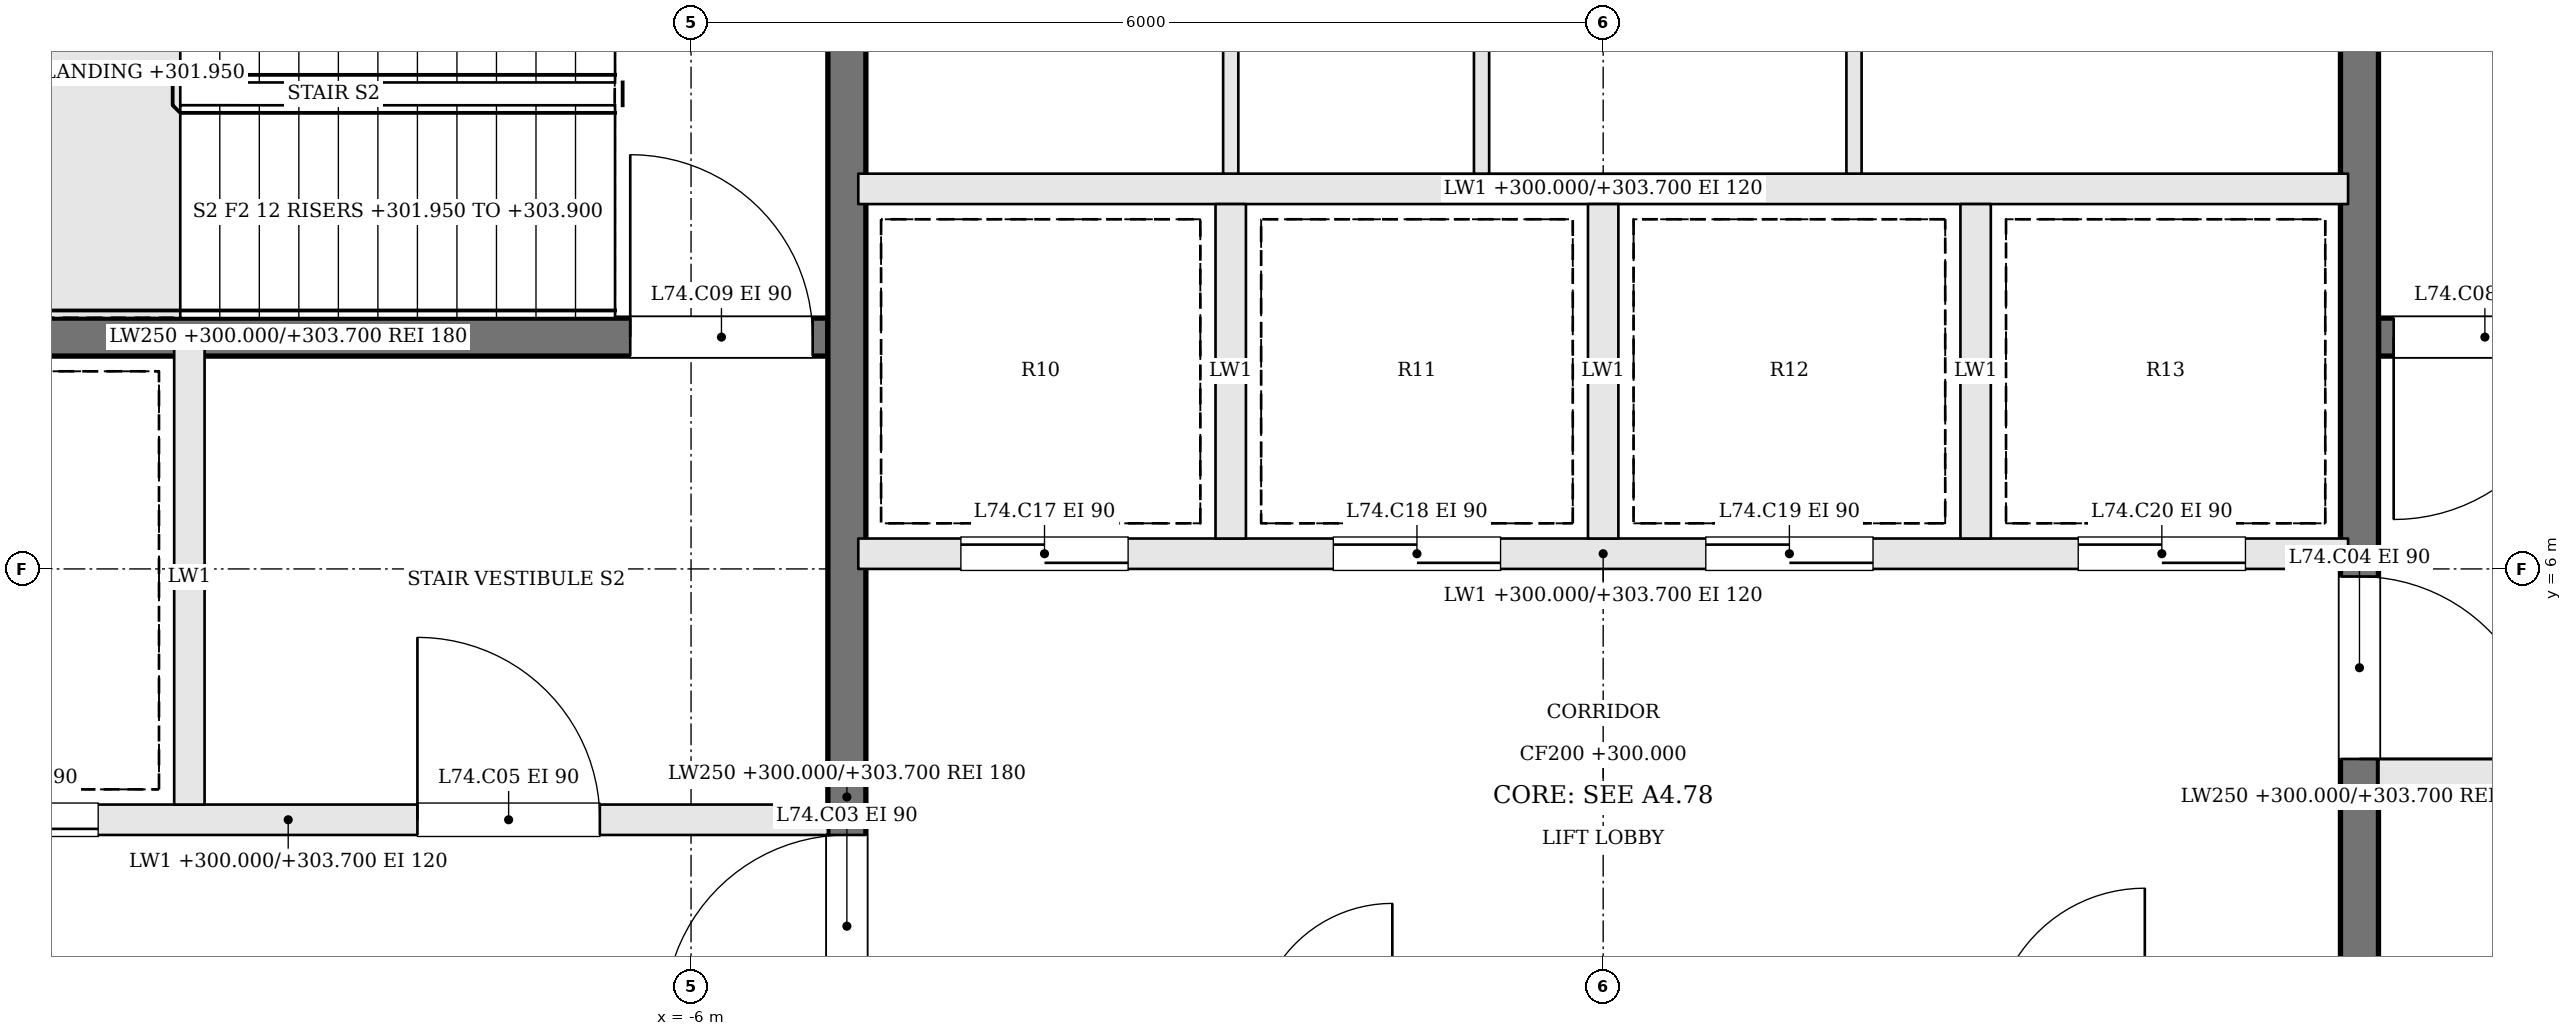
"""IFC4 building model, lengths in metres.
Left out: names, types, materials, properties, quantities, classifications, styles, units other than length and angle.
Written with IfcOpenShell. Run it as: python <this file> out.ifc"""

import sys

from ifc_helpers import new_model, si_unit, direction, frame, frame_2d, origin, place, context, subcontext, project, spatial, rectangle, extrude, element, fill, save


model = new_model("IFC4")
c1 = context("Model", 3, precision=1e-05, world=origin(), true_north=direction((0.0, 1.0)))
c2 = subcontext(c1, "Body", "Model", "MODEL_VIEW")
j1 = project(units=[si_unit("LENGTHUNIT", "METRE"), si_unit("PLANEANGLEUNIT", "RADIAN")], contexts=[c1])
p1 = place(None, origin())
s1 = spatial("IfcSite", under=j1, at=p1, CompositionType="ELEMENT")
p2 = place(p1, origin())
s2 = spatial("IfcBuilding", under=s1, at=p2, CompositionType="ELEMENT")
p3 = place(p2, frame((0.0, 0.0, 300.0)))
s3 = spatial("IfcBuildingStorey", under=s2, at=p3, CompositionType="ELEMENT", Elevation=300.0)
p4 = place(p3, frame((12.2, 7.525, 0.0), z_axis=(0.0, 0.0, 1.0), x_axis=(-1.0, 0.0, 0.0)))
e1 = element("IfcWall", 1, at=p4, inside=s3, PredefinedType="SOLIDWALL", context=c2, shape_type="SweptSolid", body=[
    extrude(rectangle(XDim=7.1, YDim=0.25, at=frame_2d((3.55, 0.0))), origin(), (0.0, 0.0, 1.0), 3.7),
])
p5 = place(p4, frame((5.8, 0.0, 0.0)))
e2 = element("IfcOpeningElement", 2, at=p5, cuts=e1, PredefinedType="OPENING", context=c2, shape_type="SweptSolid", body=[
    extrude(rectangle(XDim=1.2, YDim=2.1, at=frame_2d((0.6, 1.05))), frame((0.0, 0.135, 0.0), z_axis=(0.0, -1.0, 0.0), x_axis=(1.0, 0.0, 0.0)), (0.0, 0.0, 1.0), 0.27),
])
p6 = place(p3, frame((-12.2, 4.35, 0.0), z_axis=(0.0, 0.0, 1.0), x_axis=(1.0, 0.0, 0.0)))
e3 = element("IfcWall", 3, at=p6, inside=s3, PredefinedType="SOLIDWALL", context=c2, shape_type="SweptSolid", body=[
    extrude(rectangle(XDim=7.1, YDim=0.2, at=frame_2d((3.55, 0.0))), origin(), (0.0, 0.0, 1.0), 3.7),
])
p7 = place(p6, frame((4.4, 0.0, 0.0)))
e4 = element("IfcOpeningElement", 4, at=p7, cuts=e3, PredefinedType="OPENING", context=c2, shape_type="SweptSolid", body=[
    extrude(rectangle(XDim=1.2, YDim=2.1, at=frame_2d((0.6, 1.05))), frame((0.0, 0.11, 0.0), z_axis=(0.0, -1.0, 0.0), x_axis=(1.0, 0.0, 0.0)), (0.0, 0.0, 1.0), 0.22),
])
p8 = place(p6, frame((1.1, 0.0, 0.0)))
e5 = element("IfcOpeningElement", 5, at=p8, cuts=e3, PredefinedType="OPENING", context=c2, shape_type="SweptSolid", body=[
    extrude(rectangle(XDim=1.2, YDim=2.1, at=frame_2d((0.6, 1.05))), frame((0.0, 0.11, 0.0), z_axis=(0.0, -1.0, 0.0), x_axis=(1.0, 0.0, 0.0)), (0.0, 0.0, 1.0), 0.22),
])
p9 = place(p3, frame((12.2, 4.65, 0.0), z_axis=(0.0, 0.0, 1.0), x_axis=(-1.0, 0.0, 0.0)))
e6 = element("IfcWall", 6, at=p9, inside=s3, PredefinedType="SOLIDWALL", context=c2, shape_type="SweptSolid", body=[
    extrude(rectangle(XDim=7.1, YDim=0.2, at=frame_2d((3.55, 0.0))), origin(), (0.0, 0.0, 1.0), 3.7),
])
p10 = place(p9, frame((4.4, 0.0, 0.0)))
e7 = element("IfcOpeningElement", 7, at=p10, cuts=e6, PredefinedType="OPENING", context=c2, shape_type="SweptSolid", body=[
    extrude(rectangle(XDim=1.2, YDim=2.1, at=frame_2d((0.6, 1.05))), frame((0.0, 0.11, 0.0), z_axis=(0.0, -1.0, 0.0), x_axis=(1.0, 0.0, 0.0)), (0.0, 0.0, 1.0), 0.22),
])
p11 = place(p9, frame((1.1, 0.0, 0.0)))
e8 = element("IfcOpeningElement", 8, at=p11, cuts=e6, PredefinedType="OPENING", context=c2, shape_type="SweptSolid", body=[
    extrude(rectangle(XDim=1.2, YDim=2.1, at=frame_2d((0.6, 1.05))), frame((0.0, 0.11, 0.0), z_axis=(0.0, -1.0, 0.0), x_axis=(1.0, 0.0, 0.0)), (0.0, 0.0, 1.0), 0.22),
])
p12 = place(p3, frame((-12.2, 7.525, 0.0), z_axis=(0.0, 0.0, 1.0), x_axis=(1.0, 0.0, 0.0)))
e9 = element("IfcWall", 9, at=p12, inside=s3, PredefinedType="SOLIDWALL", context=c2, shape_type="SweptSolid", body=[
    extrude(rectangle(XDim=7.1, YDim=0.25, at=frame_2d((3.55, 0.0))), origin(), (0.0, 0.0, 1.0), 3.7),
])
p13 = place(p12, frame((5.8, 0.0, 0.0)))
e10 = element("IfcOpeningElement", 10, at=p13, cuts=e9, PredefinedType="OPENING", context=c2, shape_type="SweptSolid", body=[
    extrude(rectangle(XDim=1.2, YDim=2.1, at=frame_2d((0.6, 1.05))), frame((0.0, 0.135, 0.0), z_axis=(0.0, -1.0, 0.0), x_axis=(1.0, 0.0, 0.0)), (0.0, 0.0, 1.0), 0.27),
])
p14 = place(p3, frame((-9.3, 4.45, 0.0), z_axis=(0.0, 0.0, 1.0), x_axis=(0.0, 1.0, 0.0)))
e11 = element("IfcWall", 11, at=p14, inside=s3, PredefinedType="SOLIDWALL", context=c2, shape_type="SweptSolid", body=[
    extrude(rectangle(XDim=3.0, YDim=0.2, at=frame_2d((1.5, 0.0))), origin(), (0.0, 0.0, 1.0), 3.7),
])
p15 = place(p3, frame((-4.975, -2.2, 0.0), z_axis=(0.0, 0.0, 1.0), x_axis=(0.0, 1.0, 0.0)))
e12 = element("IfcWall", 12, at=p15, inside=s3, PredefinedType="SOLIDWALL", context=c2, shape_type="SweptSolid", body=[
    extrude(rectangle(XDim=13.4, YDim=0.25, at=frame_2d((6.7, 0.0))), origin(), (0.0, 0.0, 1.0), 3.7),
])
p16 = place(p15, frame((5.25, 0.0, 0.0)))
e13 = element("IfcOpeningElement", 13, at=p16, cuts=e12, PredefinedType="OPENING", context=c2, shape_type="SweptSolid", body=[
    extrude(rectangle(XDim=1.2, YDim=2.1, at=frame_2d((0.6, 1.05))), frame((0.0, 0.135, 0.0), z_axis=(0.0, -1.0, 0.0), x_axis=(1.0, 0.0, 0.0)), (0.0, 0.0, 1.0), 0.27),
])
p17 = place(p3, frame((4.975, 11.2, 0.0), z_axis=(0.0, 0.0, 1.0), x_axis=(0.0, -1.0, 0.0)))
e14 = element("IfcWall", 14, at=p17, inside=s3, PredefinedType="SOLIDWALL", context=c2, shape_type="SweptSolid", body=[
    extrude(rectangle(XDim=13.4, YDim=0.25, at=frame_2d((6.7, 0.0))), origin(), (0.0, 0.0, 1.0), 3.7),
])
p18 = place(p17, frame((5.25, 0.0, 0.0)))
e15 = element("IfcOpeningElement", 15, at=p18, cuts=e14, PredefinedType="OPENING", context=c2, shape_type="SweptSolid", body=[
    extrude(rectangle(XDim=1.2, YDim=2.1, at=frame_2d((0.6, 1.05))), frame((0.0, 0.135, 0.0), z_axis=(0.0, -1.0, 0.0), x_axis=(1.0, 0.0, 0.0)), (0.0, 0.0, 1.0), 0.27),
])
p19 = place(p3, frame((-4.9, 6.1, 0.0), z_axis=(0.0, 0.0, 1.0), x_axis=(1.0, 0.0, 0.0)))
e16 = element("IfcWall", 16, at=p19, inside=s3, PredefinedType="SOLIDWALL", context=c2, shape_type="SweptSolid", body=[
    extrude(rectangle(XDim=9.8, YDim=0.2, at=frame_2d((4.9, 0.0))), origin(), (0.0, 0.0, 1.0), 3.7),
])
p20 = place(p19, frame((0.675, 0.0, 0.0)))
e17 = element("IfcOpeningElement", 17, at=p20, cuts=e16, PredefinedType="OPENING", context=c2, shape_type="SweptSolid", body=[
    extrude(rectangle(XDim=1.1, YDim=2.1, at=frame_2d((0.55, 1.05))), frame((0.0, 0.11, 0.0), z_axis=(0.0, -1.0, 0.0), x_axis=(1.0, 0.0, 0.0)), (0.0, 0.0, 1.0), 0.22),
])
p21 = place(p19, frame((3.125, 0.0, 0.0)))
e18 = element("IfcOpeningElement", 18, at=p21, cuts=e16, PredefinedType="OPENING", context=c2, shape_type="SweptSolid", body=[
    extrude(rectangle(XDim=1.1, YDim=2.1, at=frame_2d((0.55, 1.05))), frame((0.0, 0.11, 0.0), z_axis=(0.0, -1.0, 0.0), x_axis=(1.0, 0.0, 0.0)), (0.0, 0.0, 1.0), 0.22),
])
p22 = place(p19, frame((5.575, 0.0, 0.0)))
e19 = element("IfcOpeningElement", 19, at=p22, cuts=e16, PredefinedType="OPENING", context=c2, shape_type="SweptSolid", body=[
    extrude(rectangle(XDim=1.1, YDim=2.1, at=frame_2d((0.55, 1.05))), frame((0.0, 0.11, 0.0), z_axis=(0.0, -1.0, 0.0), x_axis=(1.0, 0.0, 0.0)), (0.0, 0.0, 1.0), 0.22),
])
p23 = place(p19, frame((8.025, 0.0, 0.0)))
e20 = element("IfcOpeningElement", 20, at=p23, cuts=e16, PredefinedType="OPENING", context=c2, shape_type="SweptSolid", body=[
    extrude(rectangle(XDim=1.1, YDim=2.1, at=frame_2d((0.55, 1.05))), frame((0.0, 0.11, 0.0), z_axis=(0.0, -1.0, 0.0), x_axis=(1.0, 0.0, 0.0)), (0.0, 0.0, 1.0), 0.22),
])
p24 = place(p3, frame((-4.9, 8.5, 0.0), z_axis=(0.0, 0.0, 1.0), x_axis=(1.0, 0.0, 0.0)))
e21 = element("IfcWall", 21, at=p24, inside=s3, PredefinedType="SOLIDWALL", context=c2, shape_type="SweptSolid", body=[
    extrude(rectangle(XDim=9.8, YDim=0.2, at=frame_2d((4.9, 0.0))), origin(), (0.0, 0.0, 1.0), 3.7),
])
for number, where, z_axis, x_axis in (
    (22, (-2.45, 6.2, 0.0), (0.0, 0.0, 1.0), (0.0, 1.0, 0.0)),
    (23, (0.0, 6.2, 0.0), (0.0, 0.0, 1.0), (0.0, 1.0, 0.0)),
    (24, (2.45, 6.2, 0.0), (0.0, 0.0, 1.0), (0.0, 1.0, 0.0)),
):
    element("IfcWall", number, at=place(p3, frame(where, z_axis=z_axis, x_axis=x_axis)), inside=s3, PredefinedType="SOLIDWALL", context=c2, shape_type="SweptSolid", body=[
        extrude(rectangle(XDim=2.2, YDim=0.2, at=frame_2d((1.1, 0.0))), origin(), (0.0, 0.0, 1.0), 3.7),
    ])
for number, where, z_axis, x_axis in (
    (25, (-2.45, 8.6, 0.0), (0.0, 0.0, 1.0), (0.0, 1.0, 0.0)),
    (26, (-0.8, 8.6, 0.0), (0.0, 0.0, 1.0), (0.0, 1.0, 0.0)),
    (27, (1.65, 8.6, 0.0), (0.0, 0.0, 1.0), (0.0, 1.0, 0.0)),
):
    element("IfcWall", number, at=place(p3, frame(where, z_axis=z_axis, x_axis=x_axis)), inside=s3, PredefinedType="PARTITIONING", context=c2, shape_type="SweptSolid", body=[
        extrude(rectangle(XDim=2.6, YDim=0.1, at=frame_2d((1.3, 0.0))), origin(), (0.0, 0.0, 1.0), 3.7),
    ])
p25 = place(p16, origin())
e28 = element("IfcDoor", 28, at=p25, inside=s3, OperationType="SINGLE_SWING_LEFT", PredefinedType="DOOR", context=c2, shape_type="SweptSolid", body=[
    extrude(rectangle(XDim=1.2, YDim=2.1, at=frame_2d((0.6, 1.05))), frame((0.0, 0.025, 0.0), z_axis=(0.0, -1.0, 0.0), x_axis=(1.0, 0.0, 0.0)), (0.0, 0.0, 1.0), 0.05),
])
fill(e13, e28)
p26 = place(p18, origin())
e29 = element("IfcDoor", 29, at=p26, inside=s3, OperationType="SINGLE_SWING_RIGHT", PredefinedType="DOOR", context=c2, shape_type="SweptSolid", body=[
    extrude(rectangle(XDim=1.2, YDim=2.1, at=frame_2d((0.6, 1.05))), frame((0.0, 0.025, 0.0), z_axis=(0.0, -1.0, 0.0), x_axis=(1.0, 0.0, 0.0)), (0.0, 0.0, 1.0), 0.05),
])
fill(e15, e29)
p27 = place(p7, origin())
e30 = element("IfcDoor", 30, at=p27, inside=s3, OperationType="SINGLE_SWING_LEFT", PredefinedType="DOOR", context=c2, shape_type="SweptSolid", body=[
    extrude(rectangle(XDim=1.2, YDim=2.1, at=frame_2d((0.6, 1.05))), frame((0.0, 0.025, 0.0), z_axis=(0.0, -1.0, 0.0), x_axis=(1.0, 0.0, 0.0)), (0.0, 0.0, 1.0), 0.05),
])
fill(e4, e30)
p28 = place(p5, origin())
e31 = element("IfcDoor", 31, at=p28, inside=s3, OperationType="SINGLE_SWING_RIGHT", PredefinedType="DOOR", context=c2, shape_type="SweptSolid", body=[
    extrude(rectangle(XDim=1.2, YDim=2.1, at=frame_2d((0.6, 1.05))), frame((0.0, 0.025, 0.0), z_axis=(0.0, -1.0, 0.0), x_axis=(1.0, 0.0, 0.0)), (0.0, 0.0, 1.0), 0.05),
])
fill(e2, e31)
p29 = place(p13, origin())
e32 = element("IfcDoor", 32, at=p29, inside=s3, OperationType="SINGLE_SWING_LEFT", PredefinedType="DOOR", context=c2, shape_type="SweptSolid", body=[
    extrude(rectangle(XDim=1.2, YDim=2.1, at=frame_2d((0.6, 1.05))), frame((0.0, 0.025, 0.0), z_axis=(0.0, -1.0, 0.0), x_axis=(1.0, 0.0, 0.0)), (0.0, 0.0, 1.0), 0.05),
])
fill(e10, e32)
p30 = place(p8, origin())
e33 = element("IfcDoor", 33, at=p30, inside=s3, OperationType="SLIDING_TO_RIGHT", PredefinedType="DOOR", context=c2, shape_type="SweptSolid", body=[
    extrude(rectangle(XDim=1.2, YDim=2.1, at=frame_2d((0.6, 1.05))), frame((0.0, 0.025, 0.0), z_axis=(0.0, -1.0, 0.0), x_axis=(1.0, 0.0, 0.0)), (0.0, 0.0, 1.0), 0.05),
])
fill(e5, e33)
p31 = place(p20, origin())
e34 = element("IfcDoor", 34, at=p31, inside=s3, OperationType="SLIDING_TO_RIGHT", PredefinedType="DOOR", context=c2, shape_type="SweptSolid", body=[
    extrude(rectangle(XDim=1.1, YDim=2.1, at=frame_2d((0.55, 1.05))), frame((0.0, 0.025, 0.0), z_axis=(0.0, -1.0, 0.0), x_axis=(1.0, 0.0, 0.0)), (0.0, 0.0, 1.0), 0.05),
])
fill(e17, e34)
p32 = place(p21, origin())
e35 = element("IfcDoor", 35, at=p32, inside=s3, OperationType="SLIDING_TO_LEFT", PredefinedType="DOOR", context=c2, shape_type="SweptSolid", body=[
    extrude(rectangle(XDim=1.1, YDim=2.1, at=frame_2d((0.55, 1.05))), frame((0.0, 0.025, 0.0), z_axis=(0.0, -1.0, 0.0), x_axis=(1.0, 0.0, 0.0)), (0.0, 0.0, 1.0), 0.05),
])
fill(e18, e35)
p33 = place(p22, origin())
e36 = element("IfcDoor", 36, at=p33, inside=s3, OperationType="SLIDING_TO_RIGHT", PredefinedType="DOOR", context=c2, shape_type="SweptSolid", body=[
    extrude(rectangle(XDim=1.1, YDim=2.1, at=frame_2d((0.55, 1.05))), frame((0.0, 0.025, 0.0), z_axis=(0.0, -1.0, 0.0), x_axis=(1.0, 0.0, 0.0)), (0.0, 0.0, 1.0), 0.05),
])
fill(e19, e36)
p34 = place(p23, origin())
e37 = element("IfcDoor", 37, at=p34, inside=s3, OperationType="SLIDING_TO_LEFT", PredefinedType="DOOR", context=c2, shape_type="SweptSolid", body=[
    extrude(rectangle(XDim=1.1, YDim=2.1, at=frame_2d((0.55, 1.05))), frame((0.0, 0.025, 0.0), z_axis=(0.0, -1.0, 0.0), x_axis=(1.0, 0.0, 0.0)), (0.0, 0.0, 1.0), 0.05),
])
fill(e20, e37)
save(model, sys.argv[1])
